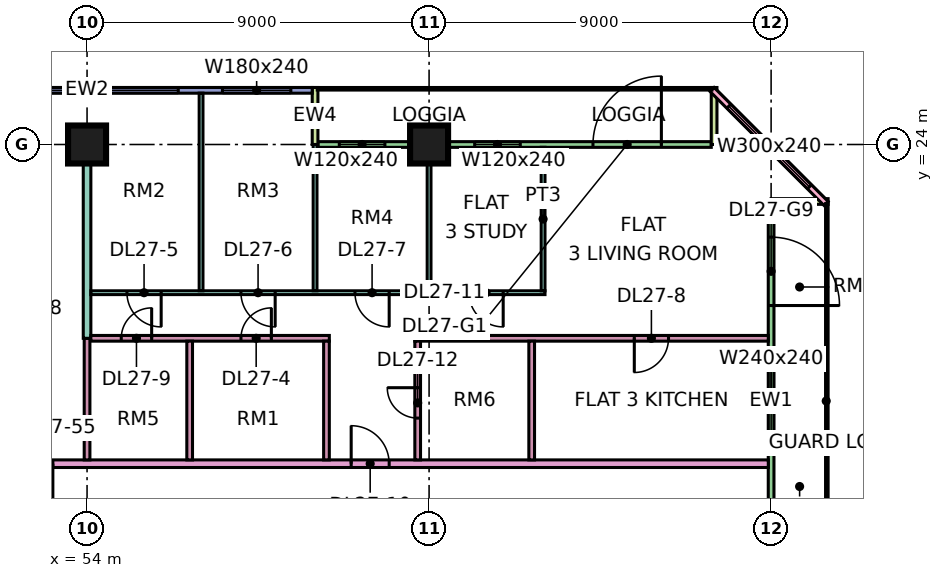
"""IFC4 building model, lengths in metres.
Left out: names, types, materials, properties, quantities, classifications, styles, units other than length and angle.
Written with IfcOpenShell. Run it as: python <this file> out.ifc"""

import sys

from ifc_helpers import new_model, si_unit, direction, frame, frame_2d, origin, origin_2d, place, context, subcontext, project, spatial, rectangle, extrude, element, fill, save


model = new_model("IFC4")
c1 = context("Model", 3, precision=1e-05, world=origin(), true_north=direction((0.0, 1.0)))
c2 = subcontext(c1, "Body", "Model", "MODEL_VIEW")
j1 = project(units=[si_unit("LENGTHUNIT", "METRE"), si_unit("PLANEANGLEUNIT", "RADIAN")], contexts=[c1])
p1 = place(None, origin())
s1 = spatial("IfcSite", under=j1, at=p1, CompositionType="ELEMENT")
p2 = place(p1, origin())
s2 = spatial("IfcBuilding", under=s1, at=p2, CompositionType="ELEMENT")
p3 = place(p2, frame((0.0, 0.0, 118.15)))
s3 = spatial("IfcBuildingStorey", under=s2, at=p3, CompositionType="ELEMENT", Elevation=118.15)
for number, where, z_axis, x_axis in (
    (1, (54.0, 24.0, 0.0), (0.0, 0.0, 1.0), (1.0, 0.0, 0.0)),
    (2, (63.0, 24.0, 0.0), (0.0, 0.0, 1.0), (1.0, 0.0, 0.0)),
):
    element("IfcColumn", number, at=place(p3, frame(where, z_axis=z_axis, x_axis=x_axis)), inside=s3, PredefinedType="COLUMN", context=c2, shape_type="SweptSolid", body=[
        extrude(rectangle(XDim=1.0, YDim=1.0, at=origin_2d()), origin(), (0.0, 0.0, 1.0), 3.75),
    ])
p4 = place(p3, frame((70.425, 24.0, 0.0), z_axis=(0.0, 0.0, 1.0), x_axis=(-1.0, 0.0, 0.0)))
e3 = element("IfcWall", 3, at=p4, inside=s3, PredefinedType="SOLIDWALL", context=c2, shape_type="SweptSolid", body=[
    extrude(rectangle(XDim=10.35, YDim=0.15, at=frame_2d((5.175, 0.0))), origin(), (0.0, 0.0, 1.0), 3.35),
])
p5 = place(p4, frame((1.312, 0.0, 0.0)))
e4 = element("IfcOpeningElement", 4, at=p5, cuts=e3, PredefinedType="OPENING", context=c2, shape_type="SweptSolid", body=[
    extrude(rectangle(XDim=1.8, YDim=2.4, at=frame_2d((0.9, 1.2))), frame((0.0, 0.085, 0.0), z_axis=(0.0, -1.0, 0.0), x_axis=(1.0, 0.0, 0.0)), (0.0, 0.0, 1.0), 0.17),
])
p6 = place(p4, frame((5.025, 0.0, 0.45)))
e5 = element("IfcOpeningElement", 5, at=p6, cuts=e3, PredefinedType="OPENING", context=c2, shape_type="SweptSolid", body=[
    extrude(rectangle(XDim=1.2, YDim=2.4, at=frame_2d((0.6, 1.2))), frame((0.0, 0.085, 0.0), z_axis=(0.0, -1.0, 0.0), x_axis=(1.0, 0.0, 0.0)), (0.0, 0.0, 1.0), 0.17),
])
p7 = place(p4, frame((8.587, 0.0, 0.45)))
e6 = element("IfcOpeningElement", 6, at=p7, cuts=e3, PredefinedType="OPENING", context=c2, shape_type="SweptSolid", body=[
    extrude(rectangle(XDim=1.2, YDim=2.4, at=frame_2d((0.6, 1.2))), frame((0.0, 0.085, 0.0), z_axis=(0.0, -1.0, 0.0), x_axis=(1.0, 0.0, 0.0)), (0.0, 0.0, 1.0), 0.17),
])
for number, where, z_axis, x_axis in (
    (7, (70.5, 25.5, 0.0), (0.0, 0.0, 1.0), (0.0, -1.0, 0.0)),
    (8, (60.0, 25.5, 0.0), (0.0, 0.0, 1.0), (0.0, -1.0, 0.0)),
):
    element("IfcWall", number, at=place(p3, frame(where, z_axis=z_axis, x_axis=x_axis)), inside=s3, PredefinedType="SOLIDWALL", context=c2, shape_type="SweptSolid", body=[
        extrude(rectangle(XDim=1.5, YDim=0.15, at=frame_2d((0.75, 0.0))), origin(), (0.0, 0.0, 1.0), 3.35),
    ])
p8 = place(p3, frame((59.925, 25.425, 0.0), z_axis=(0.0, 0.0, 1.0), x_axis=(-1.0, 0.0, 0.0)))
e9 = element("IfcWall", 9, at=p8, inside=s3, PredefinedType="SOLIDWALL", context=c2, shape_type="SweptSolid", body=[
    extrude(rectangle(XDim=11.85, YDim=0.15, at=frame_2d((5.925, 0.0))), origin(), (0.0, 0.0, 1.0), 3.35),
])
p9 = place(p8, frame((0.562, 0.0, 0.45)))
e10 = element("IfcOpeningElement", 10, at=p9, cuts=e9, PredefinedType="OPENING", context=c2, shape_type="SweptSolid", body=[
    extrude(rectangle(XDim=1.8, YDim=2.4, at=frame_2d((0.9, 1.2))), frame((0.0, 0.085, 0.0), z_axis=(0.0, -1.0, 0.0), x_axis=(1.0, 0.0, 0.0)), (0.0, 0.0, 1.0), 0.17),
])
p10 = place(p8, frame((3.525, 0.0, 0.45)))
e11 = element("IfcOpeningElement", 11, at=p10, cuts=e9, PredefinedType="OPENING", context=c2, shape_type="SweptSolid", body=[
    extrude(rectangle(XDim=1.8, YDim=2.4, at=frame_2d((0.9, 1.2))), frame((0.0, 0.085, 0.0), z_axis=(0.0, -1.0, 0.0), x_axis=(1.0, 0.0, 0.0)), (0.0, 0.0, 1.0), 0.17),
])
p11 = place(p8, frame((6.488, 0.0, 0.45)))
e12 = element("IfcOpeningElement", 12, at=p11, cuts=e9, PredefinedType="OPENING", context=c2, shape_type="SweptSolid", body=[
    extrude(rectangle(XDim=4.8, YDim=2.4, at=frame_2d((2.4, 1.2))), frame((0.0, 0.085, 0.0), z_axis=(0.0, -1.0, 0.0), x_axis=(1.0, 0.0, 0.0)), (0.0, 0.0, 1.0), 0.17),
])
p12 = place(p3, frame((72.0, 12.075, 0.0), z_axis=(0.0, 0.0, 1.0), x_axis=(0.0, 1.0, 0.0)))
e13 = element("IfcWall", 13, at=p12, inside=s3, PredefinedType="SOLIDWALL", context=c2, shape_type="SweptSolid", body=[
    extrude(rectangle(XDim=10.35, YDim=0.15, at=frame_2d((5.175, 0.0))), origin(), (0.0, 0.0, 1.0), 3.35),
])
p13 = place(p12, frame((3.975, 0.0, 0.45)))
e14 = element("IfcOpeningElement", 14, at=p13, cuts=e13, PredefinedType="OPENING", context=c2, shape_type="SweptSolid", body=[
    extrude(rectangle(XDim=2.4, YDim=2.4, at=frame_2d((1.2, 1.2))), frame((0.0, 0.085, 0.0), z_axis=(0.0, -1.0, 0.0), x_axis=(1.0, 0.0, 0.0)), (0.0, 0.0, 1.0), 0.17),
])
p14 = place(p12, frame((7.688, 0.0, 0.0)))
e15 = element("IfcOpeningElement", 15, at=p14, cuts=e13, PredefinedType="OPENING", context=c2, shape_type="SweptSolid", body=[
    extrude(rectangle(XDim=1.8, YDim=2.4, at=frame_2d((0.9, 1.2))), frame((0.0, 0.085, 0.0), z_axis=(0.0, -1.0, 0.0), x_axis=(1.0, 0.0, 0.0)), (0.0, 0.0, 1.0), 0.17),
])
p15 = place(p3, frame((73.5, 22.5, 0.0), z_axis=(0.0, 0.0, 1.0), x_axis=(-1.0, 0.0, 0.0)))
e16 = element("IfcWall", 16, at=p15, inside=s3, PredefinedType="SOLIDWALL", context=c2, shape_type="SweptSolid", body=[
    extrude(rectangle(XDim=1.5, YDim=0.15, at=frame_2d((0.75, 0.0))), origin(), (0.0, 0.0, 1.0), 3.35),
])
p16 = place(p3, frame((73.447, 22.447, 0.0), z_axis=(0.0, 0.0, 1.0), x_axis=(-0.707106781187, 0.707106781187, 0.0)))
e17 = element("IfcWall", 17, at=p16, inside=s3, PredefinedType="SOLIDWALL", context=c2, shape_type="SweptSolid", body=[
    extrude(rectangle(XDim=4.243, YDim=0.15, at=frame_2d((2.121, 0.0))), origin(), (0.0, 0.0, 1.0), 3.35),
])
p17 = place(p16, frame((0.621, 0.0, 0.45)))
e18 = element("IfcOpeningElement", 18, at=p17, cuts=e17, PredefinedType="OPENING", context=c2, shape_type="SweptSolid", body=[
    extrude(rectangle(XDim=3.0, YDim=2.4, at=frame_2d((1.5, 1.2))), frame((0.0, 0.085, 0.0), z_axis=(0.0, -1.0, 0.0), x_axis=(1.0, 0.0, 0.0)), (0.0, 0.0, 1.0), 0.17),
])
p18 = place(p3, frame((51.225, 15.6, 0.0), z_axis=(0.0, 0.0, 1.0), x_axis=(1.0, 0.0, 0.0)))
e19 = element("IfcWall", 19, at=p18, inside=s3, PredefinedType="PARTITIONING", context=c2, shape_type="SweptSolid", body=[
    extrude(rectangle(XDim=20.701, YDim=0.2, at=frame_2d((10.351, 0.0))), origin(), (0.0, 0.0, 1.0), 3.35),
])
p19 = place(p18, frame((9.725, 0.0, 0.0)))
e20 = element("IfcOpeningElement", 20, at=p19, cuts=e19, PredefinedType="OPENING", context=c2, shape_type="SweptSolid", body=[
    extrude(rectangle(XDim=1.0, YDim=2.1, at=frame_2d((0.5, 1.05))), frame((0.0, 0.11, 0.0), z_axis=(0.0, -1.0, 0.0), x_axis=(1.0, 0.0, 0.0)), (0.0, 0.0, 1.0), 0.22),
])
p20 = place(p18, frame((0.875, 0.0, 0.0)))
e21 = element("IfcOpeningElement", 21, at=p20, cuts=e19, PredefinedType="OPENING", context=c2, shape_type="SweptSolid", body=[
    extrude(rectangle(XDim=1.0, YDim=2.1, at=frame_2d((0.5, 1.05))), frame((0.0, 0.11, 0.0), z_axis=(0.0, -1.0, 0.0), x_axis=(1.0, 0.0, 0.0)), (0.0, 0.0, 1.0), 0.22),
])
p21 = place(p3, frame((54.0, 15.7, 0.0), z_axis=(0.0, 0.0, 1.0), x_axis=(0.0, 1.0, 0.0)))
e22 = element("IfcWall", 22, at=p21, inside=s3, PredefinedType="PARTITIONING", context=c2, shape_type="SweptSolid", body=[
    extrude(rectangle(XDim=3.2, YDim=0.15, at=frame_2d((1.6, 0.0))), origin(), (0.0, 0.0, 1.0), 3.35),
])
p22 = place(p3, frame((54.0, 18.9, 0.0), z_axis=(0.0, 0.0, 1.0), x_axis=(0.0, 1.0, 0.0)))
e23 = element("IfcWall", 23, at=p22, inside=s3, PredefinedType="PARTITIONING", context=c2, shape_type="SweptSolid", body=[
    extrude(rectangle(XDim=5.1, YDim=0.2, at=frame_2d((2.55, 0.0))), origin(), (0.0, 0.0, 1.0), 3.35),
])
p23 = place(p3, frame((54.1, 18.9, 0.0), z_axis=(0.0, 0.0, 1.0), x_axis=(1.0, 0.0, 0.0)))
e24 = element("IfcWall", 24, at=p23, inside=s3, PredefinedType="PARTITIONING", context=c2, shape_type="SweptSolid", body=[
    extrude(rectangle(XDim=6.275, YDim=0.15, at=frame_2d((3.137, 0.0))), origin(), (0.0, 0.0, 1.0), 3.35),
])
p24 = place(p23, frame((3.95, 0.0, 0.0)))
e25 = element("IfcOpeningElement", 25, at=p24, cuts=e24, PredefinedType="OPENING", context=c2, shape_type="SweptSolid", body=[
    extrude(rectangle(XDim=0.8, YDim=2.1, at=frame_2d((0.4, 1.05))), frame((0.0, 0.085, 0.0), z_axis=(0.0, -1.0, 0.0), x_axis=(1.0, 0.0, 0.0)), (0.0, 0.0, 1.0), 0.17),
])
p25 = place(p23, frame((0.8, 0.0, 0.0)))
e26 = element("IfcOpeningElement", 26, at=p25, cuts=e24, PredefinedType="OPENING", context=c2, shape_type="SweptSolid", body=[
    extrude(rectangle(XDim=0.8, YDim=2.1, at=frame_2d((0.4, 1.05))), frame((0.0, 0.085, 0.0), z_axis=(0.0, -1.0, 0.0), x_axis=(1.0, 0.0, 0.0)), (0.0, 0.0, 1.0), 0.17),
])
p26 = place(p3, frame((54.1, 20.1, 0.0), z_axis=(0.0, 0.0, 1.0), x_axis=(1.0, 0.0, 0.0)))
e27 = element("IfcWall", 27, at=p26, inside=s3, PredefinedType="PARTITIONING", context=c2, shape_type="SweptSolid", body=[
    extrude(rectangle(XDim=11.95, YDim=0.1, at=frame_2d((5.975, 0.0))), origin(), (0.0, 0.0, 1.0), 3.35),
])
p27 = place(p26, frame((0.95, 0.0, 0.0)))
e28 = element("IfcOpeningElement", 28, at=p27, cuts=e27, PredefinedType="OPENING", context=c2, shape_type="SweptSolid", body=[
    extrude(rectangle(XDim=0.9, YDim=2.1, at=frame_2d((0.45, 1.05))), frame((0.0, 0.06, 0.0), z_axis=(0.0, -1.0, 0.0), x_axis=(1.0, 0.0, 0.0)), (0.0, 0.0, 1.0), 0.12),
])
p28 = place(p26, frame((3.95, 0.0, 0.0)))
e29 = element("IfcOpeningElement", 29, at=p28, cuts=e27, PredefinedType="OPENING", context=c2, shape_type="SweptSolid", body=[
    extrude(rectangle(XDim=0.9, YDim=2.1, at=frame_2d((0.45, 1.05))), frame((0.0, 0.06, 0.0), z_axis=(0.0, -1.0, 0.0), x_axis=(1.0, 0.0, 0.0)), (0.0, 0.0, 1.0), 0.12),
])
p29 = place(p26, frame((6.95, 0.0, 0.0)))
e30 = element("IfcOpeningElement", 30, at=p29, cuts=e27, PredefinedType="OPENING", context=c2, shape_type="SweptSolid", body=[
    extrude(rectangle(XDim=0.9, YDim=2.1, at=frame_2d((0.45, 1.05))), frame((0.0, 0.06, 0.0), z_axis=(0.0, -1.0, 0.0), x_axis=(1.0, 0.0, 0.0)), (0.0, 0.0, 1.0), 0.12),
])
p30 = place(p26, frame((9.95, 0.0, 0.0)))
e31 = element("IfcOpeningElement", 31, at=p30, cuts=e27, PredefinedType="OPENING", context=c2, shape_type="SweptSolid", body=[
    extrude(rectangle(XDim=0.9, YDim=2.1, at=frame_2d((0.45, 1.05))), frame((0.0, 0.06, 0.0), z_axis=(0.0, -1.0, 0.0), x_axis=(1.0, 0.0, 0.0)), (0.0, 0.0, 1.0), 0.12),
])
p31 = place(p3, frame((56.7, 15.7, 0.0), z_axis=(0.0, 0.0, 1.0), x_axis=(0.0, 1.0, 0.0)))
e32 = element("IfcWall", 32, at=p31, inside=s3, PredefinedType="PARTITIONING", context=c2, shape_type="SweptSolid", body=[
    extrude(rectangle(XDim=3.125, YDim=0.15, at=frame_2d((1.562, 0.0))), origin(), (0.0, 0.0, 1.0), 3.35),
])
p32 = place(p3, frame((57.0, 20.15, 0.0), z_axis=(0.0, 0.0, 1.0), x_axis=(0.0, 1.0, 0.0)))
e33 = element("IfcWall", 33, at=p32, inside=s3, PredefinedType="PARTITIONING", context=c2, shape_type="SweptSolid", body=[
    extrude(rectangle(XDim=5.201, YDim=0.1, at=frame_2d((2.601, 0.0))), origin(), (0.0, 0.0, 1.0), 3.35),
])
p33 = place(p3, frame((60.0, 20.15, 0.0), z_axis=(0.0, 0.0, 1.0), x_axis=(0.0, 1.0, 0.0)))
e34 = element("IfcWall", 34, at=p33, inside=s3, PredefinedType="PARTITIONING", context=c2, shape_type="SweptSolid", body=[
    extrude(rectangle(XDim=3.85, YDim=0.1, at=frame_2d((1.925, 0.0))), origin(), (0.0, 0.0, 1.0), 3.35),
])
p34 = place(p3, frame((60.3, 15.7, 0.0), z_axis=(0.0, 0.0, 1.0), x_axis=(0.0, 1.0, 0.0)))
e35 = element("IfcWall", 35, at=p34, inside=s3, PredefinedType="PARTITIONING", context=c2, shape_type="SweptSolid", body=[
    extrude(rectangle(XDim=3.125, YDim=0.15, at=frame_2d((1.562, 0.0))), origin(), (0.0, 0.0, 1.0), 3.35),
])
p35 = place(p3, frame((62.625, 18.9, 0.0), z_axis=(0.0, 0.0, 1.0), x_axis=(1.0, 0.0, 0.0)))
e36 = element("IfcWall", 36, at=p35, inside=s3, PredefinedType="PARTITIONING", context=c2, shape_type="SweptSolid", body=[
    extrude(rectangle(XDim=9.301, YDim=0.15, at=frame_2d((4.65, 0.0))), origin(), (0.0, 0.0, 1.0), 3.35),
])
p36 = place(p35, frame((5.775, 0.0, 0.0)))
e37 = element("IfcOpeningElement", 37, at=p36, cuts=e36, PredefinedType="OPENING", context=c2, shape_type="SweptSolid", body=[
    extrude(rectangle(XDim=0.9, YDim=2.1, at=frame_2d((0.45, 1.05))), frame((0.0, 0.085, 0.0), z_axis=(0.0, -1.0, 0.0), x_axis=(1.0, 0.0, 0.0)), (0.0, 0.0, 1.0), 0.17),
])
p37 = place(p3, frame((62.7, 15.7, 0.0), z_axis=(0.0, 0.0, 1.0), x_axis=(0.0, 1.0, 0.0)))
e38 = element("IfcWall", 38, at=p37, inside=s3, PredefinedType="PARTITIONING", context=c2, shape_type="SweptSolid", body=[
    extrude(rectangle(XDim=3.125, YDim=0.15, at=frame_2d((1.562, 0.0))), origin(), (0.0, 0.0, 1.0), 3.35),
])
p38 = place(p37, frame((1.1, 0.0, 0.0)))
e39 = element("IfcOpeningElement", 39, at=p38, cuts=e38, PredefinedType="OPENING", context=c2, shape_type="SweptSolid", body=[
    extrude(rectangle(XDim=0.8, YDim=2.1, at=frame_2d((0.4, 1.05))), frame((0.0, 0.085, 0.0), z_axis=(0.0, -1.0, 0.0), x_axis=(1.0, 0.0, 0.0)), (0.0, 0.0, 1.0), 0.17),
])
p39 = place(p3, frame((63.0, 20.15, 0.0), z_axis=(0.0, 0.0, 1.0), x_axis=(0.0, 1.0, 0.0)))
e40 = element("IfcWall", 40, at=p39, inside=s3, PredefinedType="PARTITIONING", context=c2, shape_type="SweptSolid", body=[
    extrude(rectangle(XDim=3.776, YDim=0.1, at=frame_2d((1.888, 0.0))), origin(), (0.0, 0.0, 1.0), 3.35),
])
p40 = place(p3, frame((65.7, 15.7, 0.0), z_axis=(0.0, 0.0, 1.0), x_axis=(0.0, 1.0, 0.0)))
e41 = element("IfcWall", 41, at=p40, inside=s3, PredefinedType="PARTITIONING", context=c2, shape_type="SweptSolid", body=[
    extrude(rectangle(XDim=3.125, YDim=0.15, at=frame_2d((1.562, 0.0))), origin(), (0.0, 0.0, 1.0), 3.35),
])
p41 = place(p3, frame((66.0, 20.15, 0.0), z_axis=(0.0, 0.0, 1.0), x_axis=(0.0, 1.0, 0.0)))
e42 = element("IfcWall", 42, at=p41, inside=s3, PredefinedType="PARTITIONING", context=c2, shape_type="SweptSolid", body=[
    extrude(rectangle(XDim=3.776, YDim=0.1, at=frame_2d((1.888, 0.0))), origin(), (0.0, 0.0, 1.0), 3.35),
])
p42 = place(p5, frame((1.8, 0.0, 0.0), z_axis=(0.0, 0.0, 1.0), x_axis=(-1.0, 0.0, 0.0)))
e43 = element("IfcDoor", 43, at=p42, inside=s3, OperationType="DOUBLE_DOOR_SINGLE_SWING", PredefinedType="DOOR", context=c2, shape_type="SweptSolid", body=[
    extrude(rectangle(XDim=1.8, YDim=2.4, at=frame_2d((0.9, 1.2))), frame((0.0, 0.025, 0.0), z_axis=(0.0, -1.0, 0.0), x_axis=(1.0, 0.0, 0.0)), (0.0, 0.0, 1.0), 0.05),
])
fill(e4, e43)
p43 = place(p6, origin())
e44 = element("IfcWindow", 44, at=p43, inside=s3, PartitioningType="SINGLE_PANEL", PredefinedType="WINDOW", context=c2, shape_type="SweptSolid", body=[
    extrude(rectangle(XDim=1.2, YDim=2.4, at=frame_2d((0.6, 1.2))), frame((0.0, 0.03, 0.0), z_axis=(0.0, -1.0, 0.0), x_axis=(1.0, 0.0, 0.0)), (0.0, 0.0, 1.0), 0.06),
])
fill(e5, e44)
p44 = place(p7, origin())
e45 = element("IfcWindow", 45, at=p44, inside=s3, PartitioningType="SINGLE_PANEL", PredefinedType="WINDOW", context=c2, shape_type="SweptSolid", body=[
    extrude(rectangle(XDim=1.2, YDim=2.4, at=frame_2d((0.6, 1.2))), frame((0.0, 0.03, 0.0), z_axis=(0.0, -1.0, 0.0), x_axis=(1.0, 0.0, 0.0)), (0.0, 0.0, 1.0), 0.06),
])
fill(e6, e45)
p45 = place(p9, origin())
e46 = element("IfcWindow", 46, at=p45, inside=s3, PartitioningType="SINGLE_PANEL", PredefinedType="WINDOW", context=c2, shape_type="SweptSolid", body=[
    extrude(rectangle(XDim=1.8, YDim=2.4, at=frame_2d((0.9, 1.2))), frame((0.0, 0.03, 0.0), z_axis=(0.0, -1.0, 0.0), x_axis=(1.0, 0.0, 0.0)), (0.0, 0.0, 1.0), 0.06),
])
fill(e10, e46)
p46 = place(p10, origin())
e47 = element("IfcWindow", 47, at=p46, inside=s3, PartitioningType="SINGLE_PANEL", PredefinedType="WINDOW", context=c2, shape_type="SweptSolid", body=[
    extrude(rectangle(XDim=1.8, YDim=2.4, at=frame_2d((0.9, 1.2))), frame((0.0, 0.03, 0.0), z_axis=(0.0, -1.0, 0.0), x_axis=(1.0, 0.0, 0.0)), (0.0, 0.0, 1.0), 0.06),
])
fill(e11, e47)
p47 = place(p11, origin())
e48 = element("IfcWindow", 48, at=p47, inside=s3, PartitioningType="SINGLE_PANEL", PredefinedType="WINDOW", context=c2, shape_type="SweptSolid", body=[
    extrude(rectangle(XDim=4.8, YDim=2.4, at=frame_2d((2.4, 1.2))), frame((0.0, 0.03, 0.0), z_axis=(0.0, -1.0, 0.0), x_axis=(1.0, 0.0, 0.0)), (0.0, 0.0, 1.0), 0.06),
])
fill(e12, e48)
p48 = place(p13, origin())
e49 = element("IfcWindow", 49, at=p48, inside=s3, PartitioningType="SINGLE_PANEL", PredefinedType="WINDOW", context=c2, shape_type="SweptSolid", body=[
    extrude(rectangle(XDim=2.4, YDim=2.4, at=frame_2d((1.2, 1.2))), frame((0.0, 0.03, 0.0), z_axis=(0.0, -1.0, 0.0), x_axis=(1.0, 0.0, 0.0)), (0.0, 0.0, 1.0), 0.06),
])
fill(e14, e49)
p49 = place(p14, frame((1.8, 0.0, 0.0), z_axis=(0.0, 0.0, 1.0), x_axis=(-1.0, 0.0, 0.0)))
e50 = element("IfcDoor", 50, at=p49, inside=s3, OperationType="DOUBLE_DOOR_SINGLE_SWING", PredefinedType="DOOR", context=c2, shape_type="SweptSolid", body=[
    extrude(rectangle(XDim=1.8, YDim=2.4, at=frame_2d((0.9, 1.2))), frame((0.0, 0.025, 0.0), z_axis=(0.0, -1.0, 0.0), x_axis=(1.0, 0.0, 0.0)), (0.0, 0.0, 1.0), 0.05),
])
fill(e15, e50)
p50 = place(p17, origin())
e51 = element("IfcWindow", 51, at=p50, inside=s3, PartitioningType="SINGLE_PANEL", PredefinedType="WINDOW", context=c2, shape_type="SweptSolid", body=[
    extrude(rectangle(XDim=3.0, YDim=2.4, at=frame_2d((1.5, 1.2))), frame((0.0, 0.03, 0.0), z_axis=(0.0, -1.0, 0.0), x_axis=(1.0, 0.0, 0.0)), (0.0, 0.0, 1.0), 0.06),
])
fill(e18, e51)
p51 = place(p24, frame((0.8, 0.0, 0.0), z_axis=(0.0, 0.0, 1.0), x_axis=(-1.0, 0.0, 0.0)))
e52 = element("IfcDoor", 52, at=p51, inside=s3, OperationType="SINGLE_SWING_RIGHT", PredefinedType="DOOR", context=c2, shape_type="SweptSolid", body=[
    extrude(rectangle(XDim=0.8, YDim=2.1, at=frame_2d((0.4, 1.05))), frame((0.0, 0.025, 0.0), z_axis=(0.0, -1.0, 0.0), x_axis=(1.0, 0.0, 0.0)), (0.0, 0.0, 1.0), 0.05),
])
fill(e25, e52)
p52 = place(p27, origin())
e53 = element("IfcDoor", 53, at=p52, inside=s3, OperationType="SINGLE_SWING_RIGHT", PredefinedType="DOOR", context=c2, shape_type="SweptSolid", body=[
    extrude(rectangle(XDim=0.9, YDim=2.1, at=frame_2d((0.45, 1.05))), frame((0.0, 0.025, 0.0), z_axis=(0.0, -1.0, 0.0), x_axis=(1.0, 0.0, 0.0)), (0.0, 0.0, 1.0), 0.05),
])
fill(e28, e53)
p53 = place(p28, origin())
e54 = element("IfcDoor", 54, at=p53, inside=s3, OperationType="SINGLE_SWING_RIGHT", PredefinedType="DOOR", context=c2, shape_type="SweptSolid", body=[
    extrude(rectangle(XDim=0.9, YDim=2.1, at=frame_2d((0.45, 1.05))), frame((0.0, 0.025, 0.0), z_axis=(0.0, -1.0, 0.0), x_axis=(1.0, 0.0, 0.0)), (0.0, 0.0, 1.0), 0.05),
])
fill(e29, e54)
p54 = place(p29, origin())
e55 = element("IfcDoor", 55, at=p54, inside=s3, OperationType="SINGLE_SWING_RIGHT", PredefinedType="DOOR", context=c2, shape_type="SweptSolid", body=[
    extrude(rectangle(XDim=0.9, YDim=2.1, at=frame_2d((0.45, 1.05))), frame((0.0, 0.025, 0.0), z_axis=(0.0, -1.0, 0.0), x_axis=(1.0, 0.0, 0.0)), (0.0, 0.0, 1.0), 0.05),
])
fill(e30, e55)
p55 = place(p36, frame((0.9, 0.0, 0.0), z_axis=(0.0, 0.0, 1.0), x_axis=(-1.0, 0.0, 0.0)))
e56 = element("IfcDoor", 56, at=p55, inside=s3, OperationType="SINGLE_SWING_LEFT", PredefinedType="DOOR", context=c2, shape_type="SweptSolid", body=[
    extrude(rectangle(XDim=0.9, YDim=2.1, at=frame_2d((0.45, 1.05))), frame((0.0, 0.025, 0.0), z_axis=(0.0, -1.0, 0.0), x_axis=(1.0, 0.0, 0.0)), (0.0, 0.0, 1.0), 0.05),
])
fill(e37, e56)
p56 = place(p25, frame((0.8, 0.0, 0.0), z_axis=(0.0, 0.0, 1.0), x_axis=(-1.0, 0.0, 0.0)))
e57 = element("IfcDoor", 57, at=p56, inside=s3, OperationType="SINGLE_SWING_RIGHT", PredefinedType="DOOR", context=c2, shape_type="SweptSolid", body=[
    extrude(rectangle(XDim=0.8, YDim=2.1, at=frame_2d((0.4, 1.05))), frame((0.0, 0.025, 0.0), z_axis=(0.0, -1.0, 0.0), x_axis=(1.0, 0.0, 0.0)), (0.0, 0.0, 1.0), 0.05),
])
fill(e26, e57)
p57 = place(p19, origin())
e58 = element("IfcDoor", 58, at=p57, inside=s3, OperationType="SINGLE_SWING_LEFT", PredefinedType="DOOR", context=c2, shape_type="SweptSolid", body=[
    extrude(rectangle(XDim=1.0, YDim=2.1, at=frame_2d((0.5, 1.05))), frame((0.0, 0.025, 0.0), z_axis=(0.0, -1.0, 0.0), x_axis=(1.0, 0.0, 0.0)), (0.0, 0.0, 1.0), 0.05),
])
fill(e20, e58)
p58 = place(p30, origin())
e59 = element("IfcDoor", 59, at=p58, inside=s3, OperationType="SINGLE_SWING_RIGHT", PredefinedType="DOOR", context=c2, shape_type="SweptSolid", body=[
    extrude(rectangle(XDim=0.9, YDim=2.1, at=frame_2d((0.45, 1.05))), frame((0.0, 0.025, 0.0), z_axis=(0.0, -1.0, 0.0), x_axis=(1.0, 0.0, 0.0)), (0.0, 0.0, 1.0), 0.05),
])
fill(e31, e59)
p59 = place(p38, frame((0.8, 0.0, 0.0), z_axis=(0.0, 0.0, 1.0), x_axis=(-1.0, 0.0, 0.0)))
e60 = element("IfcDoor", 60, at=p59, inside=s3, OperationType="SINGLE_SWING_RIGHT", PredefinedType="DOOR", context=c2, shape_type="SweptSolid", body=[
    extrude(rectangle(XDim=0.8, YDim=2.1, at=frame_2d((0.4, 1.05))), frame((0.0, 0.025, 0.0), z_axis=(0.0, -1.0, 0.0), x_axis=(1.0, 0.0, 0.0)), (0.0, 0.0, 1.0), 0.05),
])
fill(e39, e60)
p60 = place(p20, origin())
e61 = element("IfcDoor", 61, at=p60, inside=s3, OperationType="SINGLE_SWING_RIGHT", PredefinedType="DOOR", context=c2, shape_type="SweptSolid", body=[
    extrude(rectangle(XDim=1.0, YDim=2.1, at=frame_2d((0.5, 1.05))), frame((0.0, 0.025, 0.0), z_axis=(0.0, -1.0, 0.0), x_axis=(1.0, 0.0, 0.0)), (0.0, 0.0, 1.0), 0.05),
])
fill(e21, e61)
save(model, sys.argv[1])
